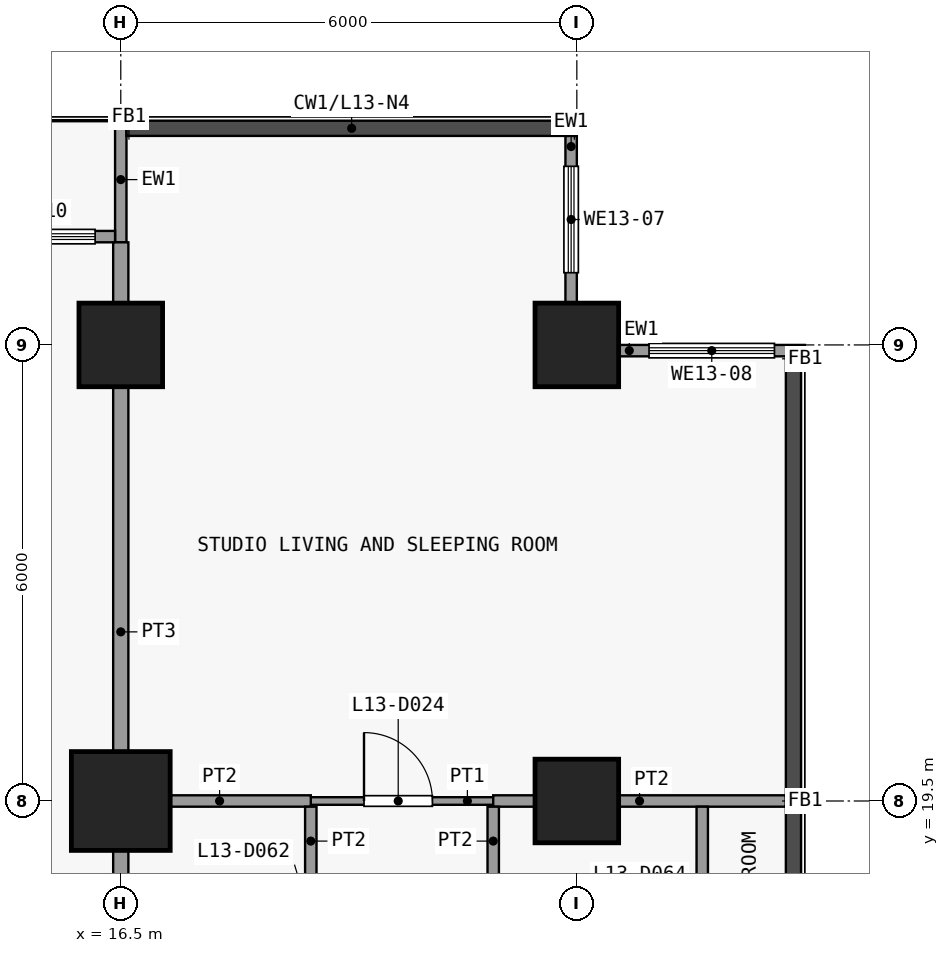
"""IFC4 building model, lengths in metres.
Left out: names, types, materials, properties, quantities, classifications, styles, units other than length and angle.
Written with IfcOpenShell. Run it as: python <this file> out.ifc"""

import sys

from ifc_helpers import new_model, si_unit, direction, frame, frame_2d, origin, origin_2d, place, context, subcontext, project, spatial, rectangle, extrude, element, fill, save


model = new_model("IFC4")
c1 = context("Model", 3, precision=1e-05, world=origin(), true_north=direction((0.0, 1.0)))
c2 = subcontext(c1, "Body", "Model", "MODEL_VIEW")
j1 = project(units=[si_unit("LENGTHUNIT", "METRE"), si_unit("PLANEANGLEUNIT", "RADIAN")], contexts=[c1])
p1 = place(None, origin())
s1 = spatial("IfcSite", under=j1, at=p1, CompositionType="ELEMENT")
p2 = place(p1, origin())
s2 = spatial("IfcBuilding", under=s1, at=p2, CompositionType="ELEMENT")
p3 = place(p2, frame((0.0, 0.0, 57.7)))
s3 = spatial("IfcBuildingStorey", under=s2, at=p3, CompositionType="ELEMENT", Elevation=57.7)
p4 = place(p3, frame((16.5, 19.5, 0.0), z_axis=(0.0, 0.0, 1.0), x_axis=(1.0, 0.0, 0.0)))
e1 = element("IfcColumn", 1, at=p4, inside=s3, PredefinedType="COLUMN", context=c2, shape_type="SweptSolid", body=[
    extrude(rectangle(XDim=1.3, YDim=1.3, at=origin_2d()), origin(), (0.0, 0.0, 1.0), 3.6),
])
for number, where, z_axis, x_axis in (
    (2, (16.5, 25.5, 0.0), (0.0, 0.0, 1.0), (1.0, 0.0, 0.0)),
    (3, (22.5, 19.5, 0.0), (0.0, 0.0, 1.0), (1.0, 0.0, 0.0)),
    (4, (22.5, 25.5, 0.0), (0.0, 0.0, 1.0), (1.0, 0.0, 0.0)),
):
    element("IfcColumn", number, at=place(p3, frame(where, z_axis=z_axis, x_axis=x_axis)), inside=s3, PredefinedType="COLUMN", context=c2, shape_type="SweptSolid", body=[
        extrude(rectangle(XDim=1.1, YDim=1.1, at=origin_2d()), origin(), (0.0, 0.0, 1.0), 3.6),
    ])
p5 = place(p3, frame((22.425, 28.25, 0.0), z_axis=(0.0, 0.0, 1.0), x_axis=(0.0, -1.0, 0.0)))
e5 = element("IfcWall", 5, at=p5, inside=s3, PredefinedType="SOLIDWALL", context=c2, shape_type="SweptSolid", body=[
    extrude(rectangle(XDim=2.2, YDim=0.15, at=frame_2d((1.1, 0.0))), origin(), (0.0, 0.0, 1.0), 3.3),
])
p6 = place(p5, frame((0.4, 0.0, 0.9)))
e6 = element("IfcOpeningElement", 6, at=p6, cuts=e5, PredefinedType="OPENING", context=c2, shape_type="SweptSolid", body=[
    extrude(rectangle(XDim=1.4, YDim=2.4, at=frame_2d((0.7, 1.2))), frame((0.0, 0.085, 0.0), z_axis=(0.0, -1.0, 0.0), x_axis=(1.0, 0.0, 0.0)), (0.0, 0.0, 1.0), 0.17),
])
p7 = place(p3, frame((23.05, 25.425, 0.0), z_axis=(0.0, 0.0, 1.0), x_axis=(1.0, 0.0, 0.0)))
e7 = element("IfcWall", 7, at=p7, inside=s3, PredefinedType="SOLIDWALL", context=c2, shape_type="SweptSolid", body=[
    extrude(rectangle(XDim=2.45, YDim=0.15, at=frame_2d((1.225, 0.0))), origin(), (0.0, 0.0, 1.0), 3.3),
])
p8 = place(p7, frame((0.4, 0.0, 0.9)))
e8 = element("IfcOpeningElement", 8, at=p8, cuts=e7, PredefinedType="OPENING", context=c2, shape_type="SweptSolid", body=[
    extrude(rectangle(XDim=1.65, YDim=2.4, at=frame_2d((0.825, 1.2))), frame((0.0, 0.085, 0.0), z_axis=(0.0, -1.0, 0.0), x_axis=(1.0, 0.0, 0.0)), (0.0, 0.0, 1.0), 0.17),
])
p9 = place(p3, frame((16.5, 26.85, 0.0), z_axis=(0.0, 0.0, 1.0), x_axis=(0.0, 1.0, 0.0)))
e9 = element("IfcWall", 9, at=p9, inside=s3, PredefinedType="SOLIDWALL", context=c2, shape_type="SweptSolid", body=[
    extrude(rectangle(XDim=1.65, YDim=0.15, at=frame_2d((0.825, 0.0))), origin(), (0.0, 0.0, 1.0), 3.3),
])
p10 = place(p3, frame((10.575, 26.925, 0.0), z_axis=(0.0, 0.0, 1.0), x_axis=(1.0, 0.0, 0.0)))
e10 = element("IfcWall", 10, at=p10, inside=s3, PredefinedType="SOLIDWALL", context=c2, shape_type="SweptSolid", body=[
    extrude(rectangle(XDim=5.85, YDim=0.15, at=frame_2d((2.925, 0.0))), origin(), (0.0, 0.0, 1.0), 3.3),
])
p11 = place(p10, frame((2.325, 0.0, 0.0)))
e11 = element("IfcOpeningElement", 11, at=p11, cuts=e10, PredefinedType="OPENING", context=c2, shape_type="SweptSolid", body=[
    extrude(rectangle(XDim=1.2, YDim=2.4, at=frame_2d((0.6, 1.2))), frame((0.0, 0.085, 0.0), z_axis=(0.0, -1.0, 0.0), x_axis=(1.0, 0.0, 0.0)), (0.0, 0.0, 1.0), 0.17),
])
p12 = place(p10, frame((0.262, 0.0, 0.9)))
e12 = element("IfcOpeningElement", 12, at=p12, cuts=e10, PredefinedType="OPENING", context=c2, shape_type="SweptSolid", body=[
    extrude(rectangle(XDim=1.8, YDim=2.1, at=frame_2d((0.9, 1.05))), frame((0.0, 0.085, 0.0), z_axis=(0.0, -1.0, 0.0), x_axis=(1.0, 0.0, 0.0)), (0.0, 0.0, 1.0), 0.17),
])
p13 = place(p10, frame((3.788, 0.0, 0.9)))
e13 = element("IfcOpeningElement", 13, at=p13, cuts=e10, PredefinedType="OPENING", context=c2, shape_type="SweptSolid", body=[
    extrude(rectangle(XDim=1.8, YDim=2.1, at=frame_2d((0.9, 1.05))), frame((0.0, 0.085, 0.0), z_axis=(0.0, -1.0, 0.0), x_axis=(1.0, 0.0, 0.0)), (0.0, 0.0, 1.0), 0.17),
])
p14 = place(p3, frame((19.0, 19.5, 0.0), z_axis=(0.0, 0.0, 1.0), x_axis=(1.0, 0.0, 0.0)))
e14 = element("IfcWall", 14, at=p14, inside=s3, PredefinedType="PARTITIONING", context=c2, shape_type="SweptSolid", body=[
    extrude(rectangle(XDim=2.4, YDim=0.1, at=frame_2d((1.2, 0.0))), origin(), (0.0, 0.0, 1.0), 3.3),
])
p15 = place(p14, frame((0.7, 0.0, 0.0)))
e15 = element("IfcOpeningElement", 15, at=p15, cuts=e14, PredefinedType="OPENING", context=c2, shape_type="SweptSolid", body=[
    extrude(rectangle(XDim=0.9, YDim=2.1, at=frame_2d((0.45, 1.05))), frame((0.0, 0.06, 0.0), z_axis=(0.0, -1.0, 0.0), x_axis=(1.0, 0.0, 0.0)), (0.0, 0.0, 1.0), 0.12),
])
p16 = place(p3, frame((16.6, 19.5, 0.0), z_axis=(0.0, 0.0, 1.0), x_axis=(1.0, 0.0, 0.0)))
e16 = element("IfcWall", 16, at=p16, inside=s3, PredefinedType="PARTITIONING", context=c2, shape_type="SweptSolid", body=[
    extrude(rectangle(XDim=2.4, YDim=0.15, at=frame_2d((1.2, 0.0))), origin(), (0.0, 0.0, 1.0), 3.3),
])
p17 = place(p3, frame((21.4, 19.5, 0.0), z_axis=(0.0, 0.0, 1.0), x_axis=(1.0, 0.0, 0.0)))
e17 = element("IfcWall", 17, at=p17, inside=s3, PredefinedType="PARTITIONING", context=c2, shape_type="SweptSolid", body=[
    extrude(rectangle(XDim=3.85, YDim=0.15, at=frame_2d((1.925, 0.0))), origin(), (0.0, 0.0, 1.0), 3.3),
])
p18 = place(p3, frame((16.5, 16.6, 0.0), z_axis=(0.0, 0.0, 1.0), x_axis=(0.0, 1.0, 0.0)))
e18 = element("IfcWall", 18, at=p18, inside=s3, PredefinedType="PARTITIONING", context=c2, shape_type="SweptSolid", body=[
    extrude(rectangle(XDim=10.25, YDim=0.2, at=frame_2d((5.125, 0.0))), origin(), (0.0, 0.0, 1.0), 3.3),
])
p19 = place(p3, frame((19.0, 16.6, 0.0), z_axis=(0.0, 0.0, 1.0), x_axis=(0.0, 1.0, 0.0)))
e19 = element("IfcWall", 19, at=p19, inside=s3, PredefinedType="PARTITIONING", context=c2, shape_type="SweptSolid", body=[
    extrude(rectangle(XDim=2.825, YDim=0.15, at=frame_2d((1.413, 0.0))), origin(), (0.0, 0.0, 1.0), 3.3),
])
p20 = place(p19, frame((0.9, 0.0, 0.0)))
e20 = element("IfcOpeningElement", 20, at=p20, cuts=e19, PredefinedType="OPENING", context=c2, shape_type="SweptSolid", body=[
    extrude(rectangle(XDim=0.9, YDim=2.1, at=frame_2d((0.45, 1.05))), frame((0.0, 0.085, 0.0), z_axis=(0.0, -1.0, 0.0), x_axis=(1.0, 0.0, 0.0)), (0.0, 0.0, 1.0), 0.17),
])
p21 = place(p3, frame((21.4, 16.6, 0.0), z_axis=(0.0, 0.0, 1.0), x_axis=(0.0, 1.0, 0.0)))
e21 = element("IfcWall", 21, at=p21, inside=s3, PredefinedType="PARTITIONING", context=c2, shape_type="SweptSolid", body=[
    extrude(rectangle(XDim=2.825, YDim=0.15, at=frame_2d((1.413, 0.0))), origin(), (0.0, 0.0, 1.0), 3.3),
])
p22 = place(p21, frame((0.9, 0.0, 0.0)))
e22 = element("IfcOpeningElement", 22, at=p22, cuts=e21, PredefinedType="OPENING", context=c2, shape_type="SweptSolid", body=[
    extrude(rectangle(XDim=0.9, YDim=2.1, at=frame_2d((0.45, 1.05))), frame((0.0, 0.085, 0.0), z_axis=(0.0, -1.0, 0.0), x_axis=(1.0, 0.0, 0.0)), (0.0, 0.0, 1.0), 0.17),
])
p23 = place(p3, frame((24.15, 16.6, 0.0), z_axis=(0.0, 0.0, 1.0), x_axis=(0.0, 1.0, 0.0)))
e23 = element("IfcWall", 23, at=p23, inside=s3, PredefinedType="PARTITIONING", context=c2, shape_type="SweptSolid", body=[
    extrude(rectangle(XDim=2.825, YDim=0.15, at=frame_2d((1.413, 0.0))), origin(), (0.0, 0.0, 1.0), 3.3),
])
p24 = place(p23, frame((1.0, 0.0, 0.0)))
e24 = element("IfcOpeningElement", 24, at=p24, cuts=e23, PredefinedType="OPENING", context=c2, shape_type="SweptSolid", body=[
    extrude(rectangle(XDim=0.9, YDim=2.1, at=frame_2d((0.45, 1.05))), frame((0.0, 0.085, 0.0), z_axis=(0.0, -1.0, 0.0), x_axis=(1.0, 0.0, 0.0)), (0.0, 0.0, 1.0), 0.17),
])
p25 = place(p6, origin())
e25 = element("IfcWindow", 25, at=p25, inside=s3, PartitioningType="SINGLE_PANEL", PredefinedType="WINDOW", context=c2, shape_type="SweptSolid", body=[
    extrude(rectangle(XDim=1.4, YDim=2.4, at=frame_2d((0.7, 1.2))), frame((0.0, 0.03, 0.0), z_axis=(0.0, -1.0, 0.0), x_axis=(1.0, 0.0, 0.0)), (0.0, 0.0, 1.0), 0.06),
])
fill(e6, e25)
p26 = place(p8, origin())
e26 = element("IfcWindow", 26, at=p26, inside=s3, PartitioningType="SINGLE_PANEL", PredefinedType="WINDOW", context=c2, shape_type="SweptSolid", body=[
    extrude(rectangle(XDim=1.65, YDim=2.4, at=frame_2d((0.825, 1.2))), frame((0.0, 0.03, 0.0), z_axis=(0.0, -1.0, 0.0), x_axis=(1.0, 0.0, 0.0)), (0.0, 0.0, 1.0), 0.06),
])
fill(e8, e26)
p27 = place(p13, origin())
e27 = element("IfcWindow", 27, at=p27, inside=s3, PartitioningType="SINGLE_PANEL", PredefinedType="WINDOW", context=c2, shape_type="SweptSolid", body=[
    extrude(rectangle(XDim=1.8, YDim=2.1, at=frame_2d((0.9, 1.05))), frame((0.0, 0.03, 0.0), z_axis=(0.0, -1.0, 0.0), x_axis=(1.0, 0.0, 0.0)), (0.0, 0.0, 1.0), 0.06),
])
fill(e13, e27)
p28 = place(p15, origin())
e28 = element("IfcDoor", 28, at=p28, inside=s3, OperationType="SINGLE_SWING_RIGHT", PredefinedType="DOOR", context=c2, shape_type="SweptSolid", body=[
    extrude(rectangle(XDim=0.9, YDim=2.1, at=frame_2d((0.45, 1.05))), frame((0.0, 0.025, 0.0), z_axis=(0.0, -1.0, 0.0), x_axis=(1.0, 0.0, 0.0)), (0.0, 0.0, 1.0), 0.05),
])
fill(e15, e28)
save(model, sys.argv[1])
